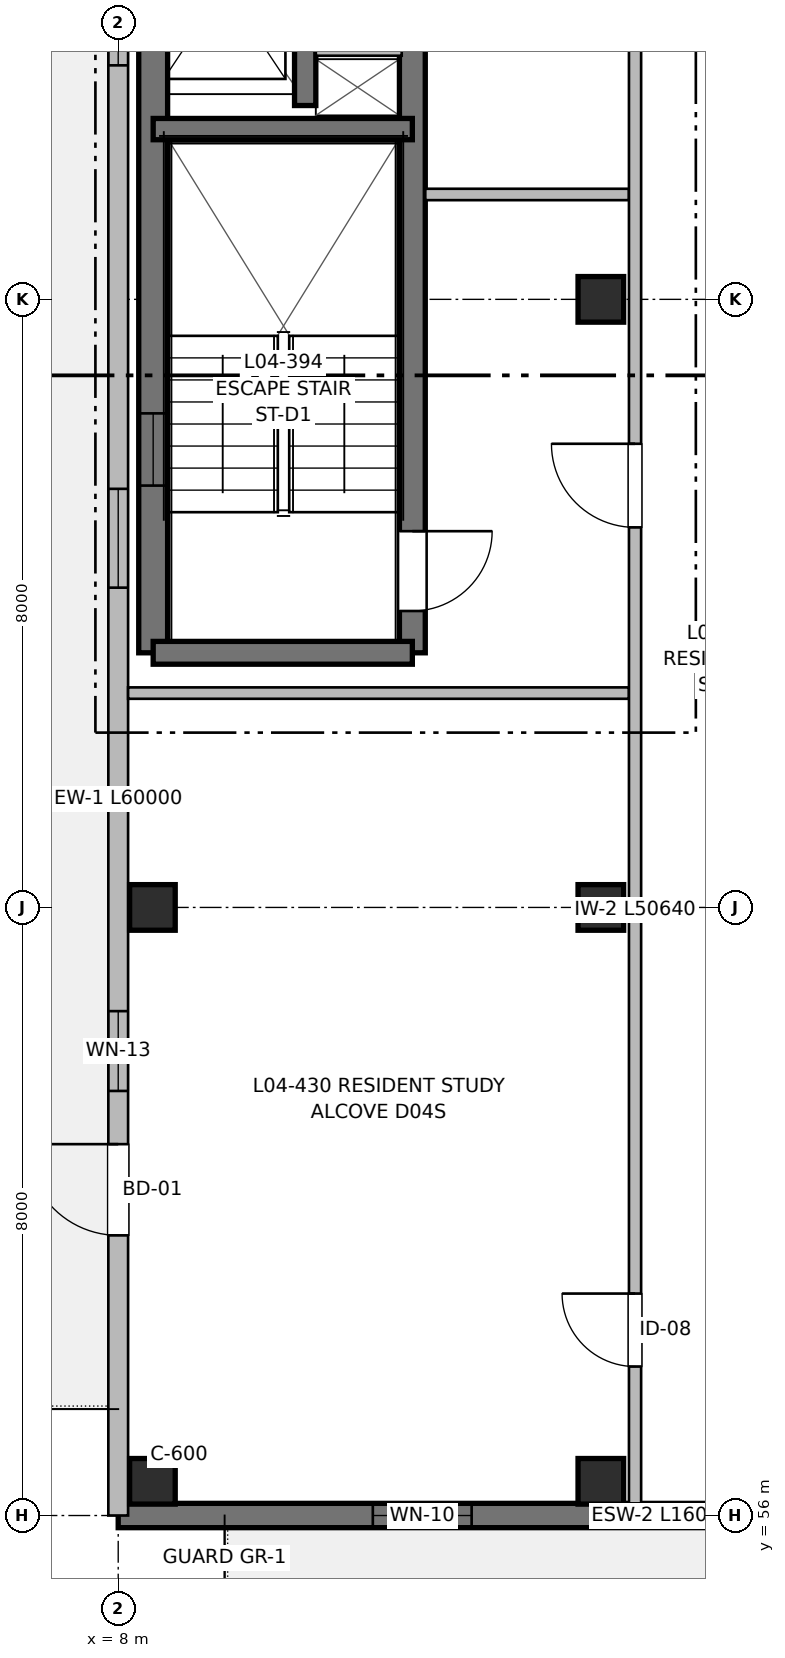
"""IFC4 building model, lengths in metres.
Left out: names, types, materials, properties, quantities, classifications, styles, units other than length and angle.
Written with IfcOpenShell. Run it as: python <this file> out.ifc"""

import sys

from ifc_helpers import new_model, si_unit, direction, frame, frame_2d, origin, origin_2d, place, context, subcontext, project, spatial, rectangle, extrude, element, fill, save


model = new_model("IFC4")
c1 = context("Model", 3, precision=1e-05, world=origin(), true_north=direction((0.0, 1.0)))
c2 = subcontext(c1, "Body", "Model", "MODEL_VIEW")
j1 = project(units=[si_unit("LENGTHUNIT", "METRE"), si_unit("PLANEANGLEUNIT", "RADIAN")], contexts=[c1])
p1 = place(None, origin())
s1 = spatial("IfcSite", under=j1, at=p1, CompositionType="ELEMENT")
p2 = place(p1, origin())
s2 = spatial("IfcBuilding", under=s1, at=p2, CompositionType="ELEMENT")
p3 = place(p2, frame((0.0, 0.0, 13.76)))
s3 = spatial("IfcBuildingStorey", under=s2, at=p3, CompositionType="ELEMENT", Elevation=13.76)
for number, where, z_axis, x_axis in (
    (1, (8.45, 56.45, 0.0), (0.0, 0.0, 1.0), (1.0, 0.0, 0.0)),
    (2, (8.45, 64.0, 0.0), (0.0, 0.0, 1.0), (1.0, 0.0, 0.0)),
    (3, (14.35, 56.45, 0.0), (0.0, 0.0, 1.0), (1.0, 0.0, 0.0)),
    (4, (14.35, 64.0, 0.0), (0.0, 0.0, 1.0), (1.0, 0.0, 0.0)),
    (5, (14.35, 72.0, 0.0), (0.0, 0.0, 1.0), (1.0, 0.0, 0.0)),
):
    element("IfcColumn", number, at=place(p3, frame(where, z_axis=z_axis, x_axis=x_axis)), inside=s3, PredefinedType="COLUMN", context=c2, shape_type="SweptSolid", body=[
        extrude(rectangle(XDim=0.6, YDim=0.6, at=origin_2d()), origin(), (0.0, 0.0, 1.0), 3.2),
    ])
p4 = place(p3, frame((8.46, 67.35, 0.0), z_axis=(0.0, 0.0, 1.0), x_axis=(0.0, 1.0, 0.0)))
e6 = element("IfcWall", 6, at=p4, inside=s3, PredefinedType="SHEAR", context=c2, shape_type="SweptSolid", body=[
    extrude(rectangle(XDim=12.45, YDim=0.38, at=frame_2d((6.225, 0.0))), origin(), (0.0, 0.0, 1.0), 3.2),
])
p5 = place(p4, frame((2.2, 0.0, 0.97)))
e7 = element("IfcOpeningElement", 7, at=p5, cuts=e6, PredefinedType="OPENING", context=c2, shape_type="SweptSolid", body=[
    extrude(rectangle(XDim=0.95, YDim=1.25, at=frame_2d((0.475, 0.625))), frame((0.0, 0.2, 0.0), z_axis=(0.0, -1.0, 0.0), x_axis=(1.0, 0.0, 0.0)), (0.0, 0.0, 1.0), 0.4),
])
p6 = place(p3, frame((11.87, 79.8, 0.0), z_axis=(0.0, 0.0, 1.0), x_axis=(0.0, -1.0, 0.0)))
e8 = element("IfcWall", 8, at=p6, inside=s3, PredefinedType="SHEAR", context=c2, shape_type="SweptSolid", body=[
    extrude(rectangle(XDim=12.45, YDim=0.34, at=frame_2d((6.225, 0.0))), origin(), (0.0, 0.0, 1.0), 3.2),
])
p7 = place(p6, frame((10.85, 0.0, 0.0)))
e9 = element("IfcOpeningElement", 9, at=p7, cuts=e8, PredefinedType="OPENING", context=c2, shape_type="SweptSolid", body=[
    extrude(rectangle(XDim=1.05, YDim=2.15, at=frame_2d((0.525, 1.075))), frame((0.0, 0.18, 0.0), z_axis=(0.0, -1.0, 0.0), x_axis=(1.0, 0.0, 0.0)), (0.0, 0.0, 1.0), 0.36),
])
p8 = place(p3, frame((11.87, 67.35, 0.0), z_axis=(0.0, 0.0, 1.0), x_axis=(-1.0, 0.0, 0.0)))
e10 = element("IfcWall", 10, at=p8, inside=s3, PredefinedType="SHEAR", context=c2, shape_type="SweptSolid", body=[
    extrude(rectangle(XDim=3.41, YDim=0.3, at=frame_2d((1.705, 0.0))), origin(), (0.0, 0.0, 1.0), 3.2),
])
p9 = place(p3, frame((8.46, 74.24, 0.0), z_axis=(0.0, 0.0, 1.0), x_axis=(1.0, 0.0, 0.0)))
e11 = element("IfcWall", 11, at=p9, inside=s3, PredefinedType="SHEAR", context=c2, shape_type="SweptSolid", body=[
    extrude(rectangle(XDim=3.41, YDim=0.28, at=frame_2d((1.705, 0.0))), origin(), (0.0, 0.0, 1.0), 3.2),
])
p10 = place(p3, frame((10.46, 74.55, 0.0), z_axis=(0.0, 0.0, 1.0), x_axis=(0.0, 1.0, 0.0)))
e12 = element("IfcWall", 12, at=p10, inside=s3, PredefinedType="SHEAR", context=c2, shape_type="SweptSolid", body=[
    extrude(rectangle(XDim=5.25, YDim=0.28, at=frame_2d((2.625, 0.0))), origin(), (0.0, 0.0, 1.0), 3.2),
])
p11 = place(p10, frame((1.15, 0.0, 0.0)))
e13 = element("IfcOpeningElement", 13, at=p11, cuts=e12, PredefinedType="OPENING", context=c2, shape_type="SweptSolid", body=[
    extrude(rectangle(XDim=1.0, YDim=2.15, at=frame_2d((0.5, 1.075))), frame((0.0, 0.15, 0.0), z_axis=(0.0, -1.0, 0.0), x_axis=(1.0, 0.0, 0.0)), (0.0, 0.0, 1.0), 0.3),
])
p12 = place(p10, frame((3.85, 0.0, 0.0)))
e14 = element("IfcOpeningElement", 14, at=p12, cuts=e12, PredefinedType="OPENING", context=c2, shape_type="SweptSolid", body=[
    extrude(rectangle(XDim=0.9, YDim=2.15, at=frame_2d((0.45, 1.075))), frame((0.0, 0.15, 0.0), z_axis=(0.0, -1.0, 0.0), x_axis=(1.0, 0.0, 0.0)), (0.0, 0.0, 1.0), 0.3),
])
p13 = place(p3, frame((10.6, 75.28, 0.0), z_axis=(0.0, 0.0, 1.0), x_axis=(1.0, 0.0, 0.0)))
e15 = element("IfcWall", 15, at=p13, inside=s3, PredefinedType="PARTITIONING", context=c2, shape_type="SweptSolid", body=[
    extrude(rectangle(XDim=1.13, YDim=0.15, at=frame_2d((0.565, 0.0))), origin(), (0.0, 0.0, 1.0), 2.95),
])
p14 = place(p3, frame((24.0, 56.0, 0.0), z_axis=(0.0, 0.0, 1.0), x_axis=(-1.0, 0.0, 0.0)))
e16 = element("IfcWall", 16, at=p14, inside=s3, PredefinedType="SHEAR", context=c2, shape_type="SweptSolid", body=[
    extrude(rectangle(XDim=16.0, YDim=0.32, at=frame_2d((8.0, 0.0))), origin(), (0.0, 0.0, 1.0), 2.98),
])
p15 = place(p14, frame((2.55, 0.0, 0.0)))
e17 = element("IfcOpeningElement", 17, at=p15, cuts=e16, PredefinedType="OPENING", context=c2, shape_type="SweptSolid", body=[
    extrude(rectangle(XDim=1.2, YDim=2.2, at=frame_2d((0.6, 1.1))), frame((0.0, 0.17, 0.0), z_axis=(0.0, -1.0, 0.0), x_axis=(1.0, 0.0, 0.0)), (0.0, 0.0, 1.0), 0.34),
])
p16 = place(p14, frame((5.3, 0.0, 0.9)))
e18 = element("IfcOpeningElement", 18, at=p16, cuts=e16, PredefinedType="OPENING", context=c2, shape_type="SweptSolid", body=[
    extrude(rectangle(XDim=1.05, YDim=1.15, at=frame_2d((0.525, 0.575))), frame((0.0, 0.17, 0.0), z_axis=(0.0, -1.0, 0.0), x_axis=(1.0, 0.0, 0.0)), (0.0, 0.0, 1.0), 0.34),
])
p17 = place(p14, frame((11.35, 0.0, 0.82)))
e19 = element("IfcOpeningElement", 19, at=p17, cuts=e16, PredefinedType="OPENING", context=c2, shape_type="SweptSolid", body=[
    extrude(rectangle(XDim=1.3, YDim=1.4, at=frame_2d((0.65, 0.7))), frame((0.0, 0.17, 0.0), z_axis=(0.0, -1.0, 0.0), x_axis=(1.0, 0.0, 0.0)), (0.0, 0.0, 1.0), 0.34),
])
p18 = place(p3, frame((8.0, 56.0, 0.0), z_axis=(0.0, 0.0, 1.0), x_axis=(0.0, 1.0, 0.0)))
e20 = element("IfcWall", 20, at=p18, inside=s3, PredefinedType="SOLIDWALL", context=c2, shape_type="SweptSolid", body=[
    extrude(rectangle(XDim=60.0, YDim=0.26, at=frame_2d((30.0, 0.0))), origin(), (0.0, 0.0, 1.0), 2.98),
])
p19 = place(p18, frame((3.686, 0.0, 0.0)))
e21 = element("IfcOpeningElement", 21, at=p19, cuts=e20, PredefinedType="OPENING", context=c2, shape_type="SweptSolid", body=[
    extrude(rectangle(XDim=1.2, YDim=2.2, at=frame_2d((0.6, 1.1))), frame((0.0, 0.14, 0.0), z_axis=(0.0, -1.0, 0.0), x_axis=(1.0, 0.0, 0.0)), (0.0, 0.0, 1.0), 0.28),
])
p20 = place(p18, frame((5.586, 0.0, 0.9)))
e22 = element("IfcOpeningElement", 22, at=p20, cuts=e20, PredefinedType="OPENING", context=c2, shape_type="SweptSolid", body=[
    extrude(rectangle(XDim=1.05, YDim=1.15, at=frame_2d((0.525, 0.575))), frame((0.0, 0.14, 0.0), z_axis=(0.0, -1.0, 0.0), x_axis=(1.0, 0.0, 0.0)), (0.0, 0.0, 1.0), 0.28),
])
p21 = place(p18, frame((12.207, 0.0, 0.82)))
e23 = element("IfcOpeningElement", 23, at=p21, cuts=e20, PredefinedType="OPENING", context=c2, shape_type="SweptSolid", body=[
    extrude(rectangle(XDim=1.3, YDim=1.4, at=frame_2d((0.65, 0.7))), frame((0.0, 0.14, 0.0), z_axis=(0.0, -1.0, 0.0), x_axis=(1.0, 0.0, 0.0)), (0.0, 0.0, 1.0), 0.28),
])
p22 = place(p18, frame((19.079, 0.0, 0.67)))
e24 = element("IfcOpeningElement", 24, at=p22, cuts=e20, PredefinedType="OPENING", context=c2, shape_type="SweptSolid", body=[
    extrude(rectangle(XDim=2.1, YDim=1.55, at=frame_2d((1.05, 0.775))), frame((0.0, 0.14, 0.0), z_axis=(0.0, -1.0, 0.0), x_axis=(1.0, 0.0, 0.0)), (0.0, 0.0, 1.0), 0.28),
])
p23 = place(p18, frame((29.325, 0.0, 0.72)))
e25 = element("IfcOpeningElement", 25, at=p23, cuts=e20, PredefinedType="OPENING", context=c2, shape_type="SweptSolid", body=[
    extrude(rectangle(XDim=2.25, YDim=1.5, at=frame_2d((1.125, 0.75))), frame((0.0, 0.14, 0.0), z_axis=(0.0, -1.0, 0.0), x_axis=(1.0, 0.0, 0.0)), (0.0, 0.0, 1.0), 0.28),
])
p24 = place(p18, frame((38.046, 0.0, 0.9)))
e26 = element("IfcOpeningElement", 26, at=p24, cuts=e20, PredefinedType="OPENING", context=c2, shape_type="SweptSolid", body=[
    extrude(rectangle(XDim=1.05, YDim=1.15, at=frame_2d((0.525, 0.575))), frame((0.0, 0.14, 0.0), z_axis=(0.0, -1.0, 0.0), x_axis=(1.0, 0.0, 0.0)), (0.0, 0.0, 1.0), 0.28),
])
p25 = place(p18, frame((46.543, 0.0, 0.9)))
e27 = element("IfcOpeningElement", 27, at=p25, cuts=e20, PredefinedType="OPENING", context=c2, shape_type="SweptSolid", body=[
    extrude(rectangle(XDim=1.2, YDim=1.05, at=frame_2d((0.6, 0.525))), frame((0.0, 0.14, 0.0), z_axis=(0.0, -1.0, 0.0), x_axis=(1.0, 0.0, 0.0)), (0.0, 0.0, 1.0), 0.28),
])
p26 = place(p18, frame((55.839, 0.0, 0.9)))
e28 = element("IfcOpeningElement", 28, at=p26, cuts=e20, PredefinedType="OPENING", context=c2, shape_type="SweptSolid", body=[
    extrude(rectangle(XDim=0.65, YDim=0.95, at=frame_2d((0.325, 0.475))), frame((0.0, 0.14, 0.0), z_axis=(0.0, -1.0, 0.0), x_axis=(1.0, 0.0, 0.0)), (0.0, 0.0, 1.0), 0.28),
])
p27 = place(p3, frame((8.13, 66.82, 0.0), z_axis=(0.0, 0.0, 1.0), x_axis=(1.0, 0.0, 0.0)))
e29 = element("IfcWall", 29, at=p27, inside=s3, PredefinedType="PARTITIONING", context=c2, shape_type="SweptSolid", body=[
    extrude(rectangle(XDim=6.59, YDim=0.15, at=frame_2d((3.295, 0.0))), origin(), (0.0, 0.0, 1.0), 2.935),
])
p28 = place(p3, frame((12.04, 73.38, 0.0), z_axis=(0.0, 0.0, 1.0), x_axis=(1.0, 0.0, 0.0)))
e30 = element("IfcWall", 30, at=p28, inside=s3, PredefinedType="PARTITIONING", context=c2, shape_type="SweptSolid", body=[
    extrude(rectangle(XDim=2.68, YDim=0.15, at=frame_2d((1.34, 0.0))), origin(), (0.0, 0.0, 1.0), 2.935),
])
p29 = place(p3, frame((14.8, 56.16, 0.0), z_axis=(0.0, 0.0, 1.0), x_axis=(0.0, 1.0, 0.0)))
e31 = element("IfcWall", 31, at=p29, inside=s3, PredefinedType="PARTITIONING", context=c2, shape_type="SweptSolid", body=[
    extrude(rectangle(XDim=50.64, YDim=0.16, at=frame_2d((25.32, 0.0))), origin(), (0.0, 0.0, 1.0), 2.935),
])
p30 = place(p29, frame((12.84, 0.0, 0.0)))
e32 = element("IfcOpeningElement", 32, at=p30, cuts=e31, PredefinedType="OPENING", context=c2, shape_type="SweptSolid", body=[
    extrude(rectangle(XDim=1.1, YDim=2.15, at=frame_2d((0.55, 1.075))), frame((0.0, 0.09, 0.0), z_axis=(0.0, -1.0, 0.0), x_axis=(1.0, 0.0, 0.0)), (0.0, 0.0, 1.0), 0.18),
])
p31 = place(p29, frame((19.24, 0.0, 0.0)))
e33 = element("IfcOpeningElement", 33, at=p31, cuts=e31, PredefinedType="OPENING", context=c2, shape_type="SweptSolid", body=[
    extrude(rectangle(XDim=1.6, YDim=2.15, at=frame_2d((0.8, 1.075))), frame((0.0, 0.09, 0.0), z_axis=(0.0, -1.0, 0.0), x_axis=(1.0, 0.0, 0.0)), (0.0, 0.0, 1.0), 0.18),
])
p32 = place(p29, frame((1.8, 0.0, 0.0)))
e34 = element("IfcOpeningElement", 34, at=p32, cuts=e31, PredefinedType="OPENING", context=c2, shape_type="SweptSolid", body=[
    extrude(rectangle(XDim=0.96, YDim=2.15, at=frame_2d((0.48, 1.075))), frame((0.0, 0.09, 0.0), z_axis=(0.0, -1.0, 0.0), x_axis=(1.0, 0.0, 0.0)), (0.0, 0.0, 1.0), 0.18),
])
p33 = place(p29, frame((32.745, 0.0, 0.0)))
e35 = element("IfcOpeningElement", 35, at=p33, cuts=e31, PredefinedType="OPENING", context=c2, shape_type="SweptSolid", body=[
    extrude(rectangle(XDim=0.98, YDim=2.15, at=frame_2d((0.49, 1.075))), frame((0.0, 0.09, 0.0), z_axis=(0.0, -1.0, 0.0), x_axis=(1.0, 0.0, 0.0)), (0.0, 0.0, 1.0), 0.18),
])
p34 = place(p29, frame((40.955, 0.0, 0.0)))
e36 = element("IfcOpeningElement", 36, at=p34, cuts=e31, PredefinedType="OPENING", context=c2, shape_type="SweptSolid", body=[
    extrude(rectangle(XDim=0.98, YDim=2.15, at=frame_2d((0.49, 1.075))), frame((0.0, 0.09, 0.0), z_axis=(0.0, -1.0, 0.0), x_axis=(1.0, 0.0, 0.0)), (0.0, 0.0, 1.0), 0.18),
])
p35 = place(p7, origin())
e37 = element("IfcDoor", 37, at=p35, inside=s3, OperationType="SINGLE_SWING_LEFT", PredefinedType="DOOR", context=c2, shape_type="SweptSolid", body=[
    extrude(rectangle(XDim=1.05, YDim=2.15, at=frame_2d((0.525, 1.075))), frame((0.0, 0.025, 0.0), z_axis=(0.0, -1.0, 0.0), x_axis=(1.0, 0.0, 0.0)), (0.0, 0.0, 1.0), 0.05),
])
fill(e9, e37)
p36 = place(p5, origin())
e38 = element("IfcWindow", 38, at=p36, inside=s3, PartitioningType="SINGLE_PANEL", PredefinedType="WINDOW", context=c2, shape_type="SweptSolid", body=[
    extrude(rectangle(XDim=0.95, YDim=1.25, at=frame_2d((0.475, 0.625))), frame((0.0, 0.03, 0.0), z_axis=(0.0, -1.0, 0.0), x_axis=(1.0, 0.0, 0.0)), (0.0, 0.0, 1.0), 0.06),
])
fill(e7, e38)
p37 = place(p17, origin())
e39 = element("IfcWindow", 39, at=p37, inside=s3, PartitioningType="SINGLE_PANEL", PredefinedType="WINDOW", context=c2, shape_type="SweptSolid", body=[
    extrude(rectangle(XDim=1.3, YDim=1.4, at=frame_2d((0.65, 0.7))), frame((0.0, 0.03, 0.0), z_axis=(0.0, -1.0, 0.0), x_axis=(1.0, 0.0, 0.0)), (0.0, 0.0, 1.0), 0.06),
])
fill(e19, e39)
p38 = place(p19, origin())
e40 = element("IfcDoor", 40, at=p38, inside=s3, OperationType="SINGLE_SWING_RIGHT", PredefinedType="DOOR", context=c2, shape_type="SweptSolid", body=[
    extrude(rectangle(XDim=1.2, YDim=2.2, at=frame_2d((0.6, 1.1))), frame((0.0, 0.025, 0.0), z_axis=(0.0, -1.0, 0.0), x_axis=(1.0, 0.0, 0.0)), (0.0, 0.0, 1.0), 0.05),
])
fill(e21, e40)
p39 = place(p20, origin())
e41 = element("IfcWindow", 41, at=p39, inside=s3, PartitioningType="SINGLE_PANEL", PredefinedType="WINDOW", context=c2, shape_type="SweptSolid", body=[
    extrude(rectangle(XDim=1.05, YDim=1.15, at=frame_2d((0.525, 0.575))), frame((0.0, 0.03, 0.0), z_axis=(0.0, -1.0, 0.0), x_axis=(1.0, 0.0, 0.0)), (0.0, 0.0, 1.0), 0.06),
])
fill(e22, e41)
p40 = place(p21, origin())
e42 = element("IfcWindow", 42, at=p40, inside=s3, PartitioningType="SINGLE_PANEL", PredefinedType="WINDOW", context=c2, shape_type="SweptSolid", body=[
    extrude(rectangle(XDim=1.3, YDim=1.4, at=frame_2d((0.65, 0.7))), frame((0.0, 0.03, 0.0), z_axis=(0.0, -1.0, 0.0), x_axis=(1.0, 0.0, 0.0)), (0.0, 0.0, 1.0), 0.06),
])
fill(e23, e42)
p41 = place(p22, origin())
e43 = element("IfcWindow", 43, at=p41, inside=s3, PartitioningType="SINGLE_PANEL", PredefinedType="WINDOW", context=c2, shape_type="SweptSolid", body=[
    extrude(rectangle(XDim=2.1, YDim=1.55, at=frame_2d((1.05, 0.775))), frame((0.0, 0.03, 0.0), z_axis=(0.0, -1.0, 0.0), x_axis=(1.0, 0.0, 0.0)), (0.0, 0.0, 1.0), 0.06),
])
fill(e24, e43)
p42 = place(p30, origin())
e44 = element("IfcDoor", 44, at=p42, inside=s3, OperationType="SINGLE_SWING_RIGHT", PredefinedType="DOOR", context=c2, shape_type="SweptSolid", body=[
    extrude(rectangle(XDim=1.1, YDim=2.15, at=frame_2d((0.55, 1.075))), frame((0.0, 0.025, 0.0), z_axis=(0.0, -1.0, 0.0), x_axis=(1.0, 0.0, 0.0)), (0.0, 0.0, 1.0), 0.05),
])
fill(e32, e44)
p43 = place(p32, origin())
e45 = element("IfcDoor", 45, at=p43, inside=s3, OperationType="SINGLE_SWING_RIGHT", PredefinedType="DOOR", context=c2, shape_type="SweptSolid", body=[
    extrude(rectangle(XDim=0.96, YDim=2.15, at=frame_2d((0.48, 1.075))), frame((0.0, 0.025, 0.0), z_axis=(0.0, -1.0, 0.0), x_axis=(1.0, 0.0, 0.0)), (0.0, 0.0, 1.0), 0.05),
])
fill(e34, e45)
save(model, sys.argv[1])
